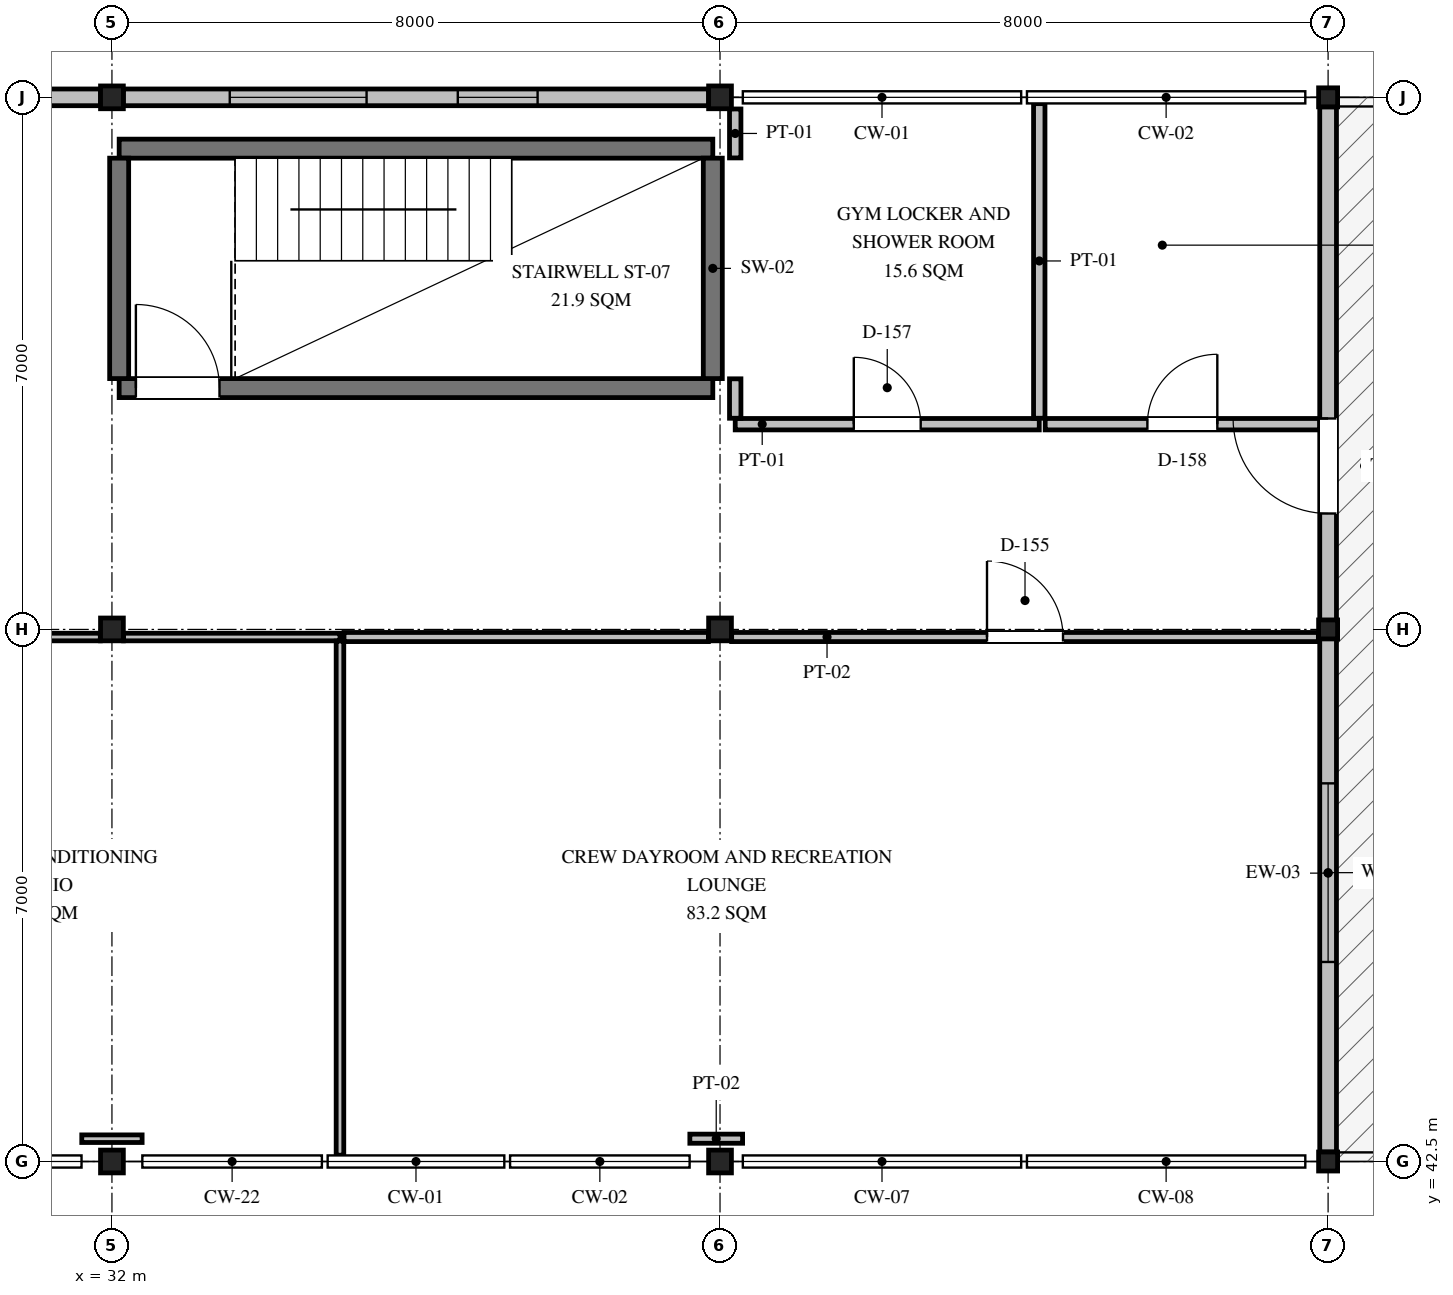
"""IFC4 building model, lengths in metres.
Left out: names, types, materials, properties, quantities, classifications, styles, units other than length and angle.
Written with IfcOpenShell. Run it as: python <this file> out.ifc"""

import sys

from ifc_helpers import new_model, si_unit, direction, frame, frame_2d, origin, origin_2d, place, context, subcontext, project, spatial, rectangle, i_section, extrude, element, fill, save


model = new_model("IFC4")
c1 = context("Model", 3, precision=1e-05, world=origin(), true_north=direction((0.0, 1.0)))
c2 = subcontext(c1, "Body", "Model", "MODEL_VIEW")
j1 = project(units=[si_unit("LENGTHUNIT", "METRE"), si_unit("PLANEANGLEUNIT", "RADIAN")], contexts=[c1])
p1 = place(None, origin())
s1 = spatial("IfcSite", under=j1, at=p1, CompositionType="ELEMENT")
p2 = place(p1, origin())
s2 = spatial("IfcBuilding", under=s1, at=p2, CompositionType="ELEMENT")
p3 = place(p2, frame((0.0, 0.0, 10.05)))
s3 = spatial("IfcBuildingStorey", under=s2, at=p3, CompositionType="ELEMENT", Elevation=10.05)
for number, where, z_axis, x_axis in (
    (1, (32.0, 42.5, 0.0), (0.0, 0.0, 1.0), (1.0, 0.0, 0.0)),
    (2, (32.0, 49.5, 0.0), (0.0, 0.0, 1.0), (1.0, 0.0, 0.0)),
    (3, (32.0, 56.5, 0.0), (0.0, 0.0, 1.0), (1.0, 0.0, 0.0)),
    (4, (40.0, 42.5, 0.0), (0.0, 0.0, 1.0), (1.0, 0.0, 0.0)),
    (5, (40.0, 49.5, 0.0), (0.0, 0.0, 1.0), (1.0, 0.0, 0.0)),
    (6, (40.0, 56.5, 0.0), (0.0, 0.0, 1.0), (1.0, 0.0, 0.0)),
):
    element("IfcColumn", number, at=place(p3, frame(where, z_axis=z_axis, x_axis=x_axis)), inside=s3, PredefinedType="COLUMN", context=c2, shape_type="SweptSolid", body=[
        extrude(i_section(OverallWidth=0.3, OverallDepth=0.3, WebThickness=0.01, FlangeThickness=0.015, FilletRadius=0.018, at=origin_2d()), origin(), (0.0, 0.0, 1.0), 4.2),
    ])
for number, where, z_axis, x_axis in (
    (7, (48.0, 42.5, 0.0), (0.0, 0.0, 1.0), (1.0, 0.0, 0.0)),
    (8, (48.0, 49.5, 0.0), (0.0, 0.0, 1.0), (1.0, 0.0, 0.0)),
    (9, (48.0, 56.5, 0.0), (0.0, 0.0, 1.0), (1.0, 0.0, 0.0)),
):
    element("IfcColumn", number, at=place(p3, frame(where, z_axis=z_axis, x_axis=x_axis)), inside=s3, PredefinedType="COLUMN", context=c2, shape_type="SweptSolid", body=[
        extrude(i_section(OverallWidth=0.25, OverallDepth=0.25, WebThickness=0.009, FlangeThickness=0.014, FilletRadius=0.016, at=origin_2d()), origin(), (0.0, 0.0, 1.0), 4.2),
    ])
p4 = place(p3, frame((48.0, 42.625, 0.0), z_axis=(0.0, 0.0, 1.0), x_axis=(0.0, 1.0, 0.0)))
e10 = element("IfcWall", 10, at=p4, inside=s3, PredefinedType="SOLIDWALL", context=c2, shape_type="SweptSolid", body=[
    extrude(rectangle(XDim=13.75, YDim=0.22, at=frame_2d((6.875, 0.0))), origin(), (0.0, 0.0, 1.0), 3.374),
])
p5 = place(p4, frame((8.4, 0.0, 0.0)))
e11 = element("IfcOpeningElement", 11, at=p5, cuts=e10, PredefinedType="OPENING", context=c2, shape_type="SweptSolid", body=[
    extrude(rectangle(XDim=1.25, YDim=2.25, at=frame_2d((0.625, 1.125))), frame((0.0, 0.12, 0.0), z_axis=(0.0, -1.0, 0.0), x_axis=(1.0, 0.0, 0.0)), (0.0, 0.0, 1.0), 0.24),
])
p6 = place(p4, frame((2.5, 0.0, 1.0)))
e12 = element("IfcOpeningElement", 12, at=p6, cuts=e10, PredefinedType="OPENING", context=c2, shape_type="SweptSolid", body=[
    extrude(rectangle(XDim=2.35, YDim=1.3, at=frame_2d((1.175, 0.65))), frame((0.0, 0.12, 0.0), z_axis=(0.0, -1.0, 0.0), x_axis=(1.0, 0.0, 0.0)), (0.0, 0.0, 1.0), 0.24),
])
p7 = place(p3, frame((24.15, 56.5, 0.0), z_axis=(0.0, 0.0, 1.0), x_axis=(1.0, 0.0, 0.0)))
e13 = element("IfcWall", 13, at=p7, inside=s3, PredefinedType="SOLIDWALL", context=c2, shape_type="SweptSolid", body=[
    extrude(rectangle(XDim=7.7, YDim=0.22, at=frame_2d((3.85, 0.0))), origin(), (0.0, 0.0, 1.0), 3.474),
])
p8 = place(p7, frame((1.4, 0.0, 0.95)))
e14 = element("IfcOpeningElement", 14, at=p8, cuts=e13, PredefinedType="OPENING", context=c2, shape_type="SweptSolid", body=[
    extrude(rectangle(XDim=1.2, YDim=1.8, at=frame_2d((0.6, 0.9))), frame((0.0, 0.12, 0.0), z_axis=(0.0, -1.0, 0.0), x_axis=(1.0, 0.0, 0.0)), (0.0, 0.0, 1.0), 0.24),
])
p9 = place(p7, frame((4.4, 0.0, 0.95)))
e15 = element("IfcOpeningElement", 15, at=p9, cuts=e13, PredefinedType="OPENING", context=c2, shape_type="SweptSolid", body=[
    extrude(rectangle(XDim=2.5, YDim=2.1, at=frame_2d((1.25, 1.05))), frame((0.0, 0.12, 0.0), z_axis=(0.0, -1.0, 0.0), x_axis=(1.0, 0.0, 0.0)), (0.0, 0.0, 1.0), 0.24),
])
p10 = place(p3, frame((32.15, 56.5, 0.0), z_axis=(0.0, 0.0, 1.0), x_axis=(1.0, 0.0, 0.0)))
e16 = element("IfcWall", 16, at=p10, inside=s3, PredefinedType="SOLIDWALL", context=c2, shape_type="SweptSolid", body=[
    extrude(rectangle(XDim=7.7, YDim=0.22, at=frame_2d((3.85, 0.0))), origin(), (0.0, 0.0, 1.0), 3.324),
])
p11 = place(p10, frame((1.4, 0.0, 0.95)))
e17 = element("IfcOpeningElement", 17, at=p11, cuts=e16, PredefinedType="OPENING", context=c2, shape_type="SweptSolid", body=[
    extrude(rectangle(XDim=1.8, YDim=1.8, at=frame_2d((0.9, 0.9))), frame((0.0, 0.12, 0.0), z_axis=(0.0, -1.0, 0.0), x_axis=(1.0, 0.0, 0.0)), (0.0, 0.0, 1.0), 0.24),
])
p12 = place(p10, frame((4.4, 0.0, 0.95)))
e18 = element("IfcOpeningElement", 18, at=p12, cuts=e16, PredefinedType="OPENING", context=c2, shape_type="SweptSolid", body=[
    extrude(rectangle(XDim=1.05, YDim=1.3, at=frame_2d((0.525, 0.65))), frame((0.0, 0.12, 0.0), z_axis=(0.0, -1.0, 0.0), x_axis=(1.0, 0.0, 0.0)), (0.0, 0.0, 1.0), 0.24),
])
p13 = place(p3, frame((32.095, 52.675, 0.0), z_axis=(0.0, 0.0, 1.0), x_axis=(1.0, 0.0, 0.0)))
e19 = element("IfcWall", 19, at=p13, inside=s3, PredefinedType="SHEAR", context=c2, shape_type="SweptSolid", body=[
    extrude(rectangle(XDim=7.81, YDim=0.25, at=frame_2d((3.905, 0.0))), origin(), (0.0, 0.0, 1.0), 3.98),
])
p14 = place(p13, frame((0.22, 0.0, 0.0)))
e20 = element("IfcOpeningElement", 20, at=p14, cuts=e19, PredefinedType="OPENING", context=c2, shape_type="SweptSolid", body=[
    extrude(rectangle(XDim=1.1, YDim=2.15, at=frame_2d((0.55, 1.075))), frame((0.0, 0.135, 0.0), z_axis=(0.0, -1.0, 0.0), x_axis=(1.0, 0.0, 0.0)), (0.0, 0.0, 1.0), 0.27),
])
p15 = place(p3, frame((32.095, 55.825, 0.0), z_axis=(0.0, 0.0, 1.0), x_axis=(1.0, 0.0, 0.0)))
e21 = element("IfcWall", 21, at=p15, inside=s3, PredefinedType="SHEAR", context=c2, shape_type="SweptSolid", body=[
    extrude(rectangle(XDim=7.81, YDim=0.25, at=frame_2d((3.905, 0.0))), origin(), (0.0, 0.0, 1.0), 3.98),
])
for number, where, z_axis, x_axis in (
    (22, (32.095, 52.8, 0.0), (0.0, 0.0, 1.0), (0.0, 1.0, 0.0)),
    (23, (39.905, 52.8, 0.0), (0.0, 0.0, 1.0), (0.0, 1.0, 0.0)),
):
    element("IfcWall", number, at=place(p3, frame(where, z_axis=z_axis, x_axis=x_axis)), inside=s3, PredefinedType="SHEAR", context=c2, shape_type="SweptSolid", body=[
        extrude(rectangle(XDim=2.9, YDim=0.25, at=frame_2d((1.45, 0.0))), origin(), (0.0, 0.0, 1.0), 3.98),
    ])
p16 = place(p3, frame((31.603, 42.8, 0.0), z_axis=(0.0, 0.0, 1.0), x_axis=(1.0, 0.0, 0.0)))
e24 = element("IfcWall", 24, at=p16, inside=s3, PredefinedType="PARTITIONING", context=c2, shape_type="SweptSolid", body=[
    extrude(rectangle(XDim=0.794, YDim=0.1, at=frame_2d((0.397, 0.0))), origin(), (0.0, 0.0, 1.0), 3.98),
])
p17 = place(p3, frame((24.153, 49.4, 0.0), z_axis=(0.0, 0.0, 1.0), x_axis=(1.0, 0.0, 0.0)))
e25 = element("IfcWall", 25, at=p17, inside=s3, PredefinedType="PARTITIONING", context=c2, shape_type="SweptSolid", body=[
    extrude(rectangle(XDim=7.694, YDim=0.1, at=frame_2d((3.847, 0.0))), origin(), (0.0, 0.0, 1.0), 3.324),
])
p18 = place(p17, frame((3.347, 0.0, 0.0)))
e26 = element("IfcOpeningElement", 26, at=p18, cuts=e25, PredefinedType="OPENING", context=c2, shape_type="SweptSolid", body=[
    extrude(rectangle(XDim=1.0, YDim=2.1, at=frame_2d((0.5, 1.05))), frame((0.0, 0.06, 0.0), z_axis=(0.0, -1.0, 0.0), x_axis=(1.0, 0.0, 0.0)), (0.0, 0.0, 1.0), 0.12),
])
p19 = place(p3, frame((32.153, 49.4, 0.0), z_axis=(0.0, 0.0, 1.0), x_axis=(1.0, 0.0, 0.0)))
e27 = element("IfcWall", 27, at=p19, inside=s3, PredefinedType="PARTITIONING", context=c2, shape_type="SweptSolid", body=[
    extrude(rectangle(XDim=2.847, YDim=0.1, at=frame_2d((1.423, 0.0))), origin(), (0.0, 0.0, 1.0), 3.374),
])
p20 = place(p3, frame((35.0, 42.583, 0.0), z_axis=(0.0, 0.0, 1.0), x_axis=(0.0, 1.0, 0.0)))
e28 = element("IfcWall", 28, at=p20, inside=s3, PredefinedType="PARTITIONING", context=c2, shape_type="SweptSolid", body=[
    extrude(rectangle(XDim=6.764, YDim=0.1, at=frame_2d((3.382, 0.0))), origin(), (0.0, 0.0, 1.0), 3.98),
])
p21 = place(p3, frame((39.603, 42.8, 0.0), z_axis=(0.0, 0.0, 1.0), x_axis=(1.0, 0.0, 0.0)))
e29 = element("IfcWall", 29, at=p21, inside=s3, PredefinedType="PARTITIONING", context=c2, shape_type="SweptSolid", body=[
    extrude(rectangle(XDim=0.694, YDim=0.12, at=frame_2d((0.347, 0.0))), origin(), (0.0, 0.0, 1.0), 3.98),
])
p22 = place(p3, frame((35.053, 49.4, 0.0), z_axis=(0.0, 0.0, 1.0), x_axis=(1.0, 0.0, 0.0)))
e30 = element("IfcWall", 30, at=p22, inside=s3, PredefinedType="PARTITIONING", context=c2, shape_type="SweptSolid", body=[
    extrude(rectangle(XDim=4.794, YDim=0.12, at=frame_2d((2.397, 0.0))), origin(), (0.0, 0.0, 1.0), 3.374),
])
p23 = place(p3, frame((40.153, 49.4, 0.0), z_axis=(0.0, 0.0, 1.0), x_axis=(1.0, 0.0, 0.0)))
e31 = element("IfcWall", 31, at=p23, inside=s3, PredefinedType="PARTITIONING", context=c2, shape_type="SweptSolid", body=[
    extrude(rectangle(XDim=7.719, YDim=0.12, at=frame_2d((3.859, 0.0))), origin(), (0.0, 0.0, 1.0), 3.424),
])
p24 = place(p23, frame((3.36, 0.0, 0.0)))
e32 = element("IfcOpeningElement", 32, at=p24, cuts=e31, PredefinedType="OPENING", context=c2, shape_type="SweptSolid", body=[
    extrude(rectangle(XDim=1.0, YDim=2.1, at=frame_2d((0.5, 1.05))), frame((0.0, 0.07, 0.0), z_axis=(0.0, -1.0, 0.0), x_axis=(1.0, 0.0, 0.0)), (0.0, 0.0, 1.0), 0.14),
])
p25 = place(p3, frame((40.2, 52.2, 0.0), z_axis=(0.0, 0.0, 1.0), x_axis=(1.0, 0.0, 0.0)))
e33 = element("IfcWall", 33, at=p25, inside=s3, PredefinedType="PARTITIONING", context=c2, shape_type="SweptSolid", body=[
    extrude(rectangle(XDim=4.0, YDim=0.15, at=frame_2d((2.0, 0.0))), origin(), (0.0, 0.0, 1.0), 3.98),
])
p26 = place(p25, frame((1.56, 0.0, 0.0)))
e34 = element("IfcOpeningElement", 34, at=p26, cuts=e33, PredefinedType="OPENING", context=c2, shape_type="SweptSolid", body=[
    extrude(rectangle(XDim=0.88, YDim=2.1, at=frame_2d((0.44, 1.05))), frame((0.0, 0.085, 0.0), z_axis=(0.0, -1.0, 0.0), x_axis=(1.0, 0.0, 0.0)), (0.0, 0.0, 1.0), 0.17),
])
p27 = place(p3, frame((40.2, 52.278, 0.0), z_axis=(0.0, 0.0, 1.0), x_axis=(0.0, 1.0, 0.0)))
e35 = element("IfcWall", 35, at=p27, inside=s3, PredefinedType="PARTITIONING", context=c2, shape_type="SweptSolid", body=[
    extrude(rectangle(XDim=0.519, YDim=0.15, at=frame_2d((0.26, 0.0))), origin(), (0.0, 0.0, 1.0), 3.98),
])
p28 = place(p3, frame((40.2, 55.703, 0.0), z_axis=(0.0, 0.0, 1.0), x_axis=(0.0, 1.0, 0.0)))
e36 = element("IfcWall", 36, at=p28, inside=s3, PredefinedType="PARTITIONING", context=c2, shape_type="SweptSolid", body=[
    extrude(rectangle(XDim=0.644, YDim=0.15, at=frame_2d((0.322, 0.0))), origin(), (0.0, 0.0, 1.0), 3.98),
])
p29 = place(p3, frame((44.2, 52.278, 0.0), z_axis=(0.0, 0.0, 1.0), x_axis=(0.0, 1.0, 0.0)))
e37 = element("IfcWall", 37, at=p29, inside=s3, PredefinedType="PARTITIONING", context=c2, shape_type="SweptSolid", body=[
    extrude(rectangle(XDim=4.139, YDim=0.15, at=frame_2d((2.069, 0.0))), origin(), (0.0, 0.0, 1.0), 3.574),
])
p30 = place(p3, frame((44.278, 52.2, 0.0), z_axis=(0.0, 0.0, 1.0), x_axis=(1.0, 0.0, 0.0)))
e38 = element("IfcWall", 38, at=p30, inside=s3, PredefinedType="PARTITIONING", context=c2, shape_type="SweptSolid", body=[
    extrude(rectangle(XDim=3.609, YDim=0.15, at=frame_2d((1.804, 0.0))), origin(), (0.0, 0.0, 1.0), 3.98),
])
p31 = place(p30, frame((1.344, 0.0, 0.0)))
e39 = element("IfcOpeningElement", 39, at=p31, cuts=e38, PredefinedType="OPENING", context=c2, shape_type="SweptSolid", body=[
    extrude(rectangle(XDim=0.92, YDim=2.1, at=frame_2d((0.46, 1.05))), frame((0.0, 0.085, 0.0), z_axis=(0.0, -1.0, 0.0), x_axis=(1.0, 0.0, 0.0)), (0.0, 0.0, 1.0), 0.17),
])
p32 = place(p5, frame((1.25, 0.0, 0.0), z_axis=(0.0, 0.0, 1.0), x_axis=(-1.0, 0.0, 0.0)))
e40 = element("IfcDoor", 40, at=p32, inside=s3, OperationType="SINGLE_SWING_RIGHT", PredefinedType="DOOR", context=c2, shape_type="SweptSolid", body=[
    extrude(rectangle(XDim=1.25, YDim=2.25, at=frame_2d((0.625, 1.125))), frame((0.0, 0.025, 0.0), z_axis=(0.0, -1.0, 0.0), x_axis=(1.0, 0.0, 0.0)), (0.0, 0.0, 1.0), 0.05),
])
fill(e11, e40)
p33 = place(p6, origin())
e41 = element("IfcWindow", 41, at=p33, inside=s3, PartitioningType="SINGLE_PANEL", PredefinedType="WINDOW", context=c2, shape_type="SweptSolid", body=[
    extrude(rectangle(XDim=2.35, YDim=1.3, at=frame_2d((1.175, 0.65))), frame((0.0, 0.03, 0.0), z_axis=(0.0, -1.0, 0.0), x_axis=(1.0, 0.0, 0.0)), (0.0, 0.0, 1.0), 0.06),
])
fill(e12, e41)
p34 = place(p11, origin())
e42 = element("IfcWindow", 42, at=p34, inside=s3, PartitioningType="SINGLE_PANEL", PredefinedType="WINDOW", context=c2, shape_type="SweptSolid", body=[
    extrude(rectangle(XDim=1.8, YDim=1.8, at=frame_2d((0.9, 0.9))), frame((0.0, 0.03, 0.0), z_axis=(0.0, -1.0, 0.0), x_axis=(1.0, 0.0, 0.0)), (0.0, 0.0, 1.0), 0.06),
])
fill(e17, e42)
p35 = place(p12, origin())
e43 = element("IfcWindow", 43, at=p35, inside=s3, PartitioningType="SINGLE_PANEL", PredefinedType="WINDOW", context=c2, shape_type="SweptSolid", body=[
    extrude(rectangle(XDim=1.05, YDim=1.3, at=frame_2d((0.525, 0.65))), frame((0.0, 0.03, 0.0), z_axis=(0.0, -1.0, 0.0), x_axis=(1.0, 0.0, 0.0)), (0.0, 0.0, 1.0), 0.06),
])
fill(e18, e43)
p36 = place(p14, frame((1.1, 0.0, 0.0), z_axis=(0.0, 0.0, 1.0), x_axis=(-1.0, 0.0, 0.0)))
e44 = element("IfcDoor", 44, at=p36, inside=s3, OperationType="SINGLE_SWING_LEFT", PredefinedType="DOOR", context=c2, shape_type="SweptSolid", body=[
    extrude(rectangle(XDim=1.1, YDim=2.15, at=frame_2d((0.55, 1.075))), frame((0.0, 0.025, 0.0), z_axis=(0.0, -1.0, 0.0), x_axis=(1.0, 0.0, 0.0)), (0.0, 0.0, 1.0), 0.05),
])
fill(e20, e44)
p37 = place(p24, origin())
e45 = element("IfcDoor", 45, at=p37, inside=s3, OperationType="SINGLE_SWING_LEFT", PredefinedType="DOOR", context=c2, shape_type="SweptSolid", body=[
    extrude(rectangle(XDim=1.0, YDim=2.1, at=frame_2d((0.5, 1.05))), frame((0.0, 0.025, 0.0), z_axis=(0.0, -1.0, 0.0), x_axis=(1.0, 0.0, 0.0)), (0.0, 0.0, 1.0), 0.05),
])
fill(e32, e45)
p38 = place(p26, origin())
e46 = element("IfcDoor", 46, at=p38, inside=s3, OperationType="SINGLE_SWING_LEFT", PredefinedType="DOOR", context=c2, shape_type="SweptSolid", body=[
    extrude(rectangle(XDim=0.88, YDim=2.1, at=frame_2d((0.44, 1.05))), frame((0.0, 0.025, 0.0), z_axis=(0.0, -1.0, 0.0), x_axis=(1.0, 0.0, 0.0)), (0.0, 0.0, 1.0), 0.05),
])
fill(e34, e46)
p39 = place(p31, origin())
e47 = element("IfcDoor", 47, at=p39, inside=s3, OperationType="SINGLE_SWING_RIGHT", PredefinedType="DOOR", context=c2, shape_type="SweptSolid", body=[
    extrude(rectangle(XDim=0.92, YDim=2.1, at=frame_2d((0.46, 1.05))), frame((0.0, 0.025, 0.0), z_axis=(0.0, -1.0, 0.0), x_axis=(1.0, 0.0, 0.0)), (0.0, 0.0, 1.0), 0.05),
])
fill(e39, e47)
save(model, sys.argv[1])
